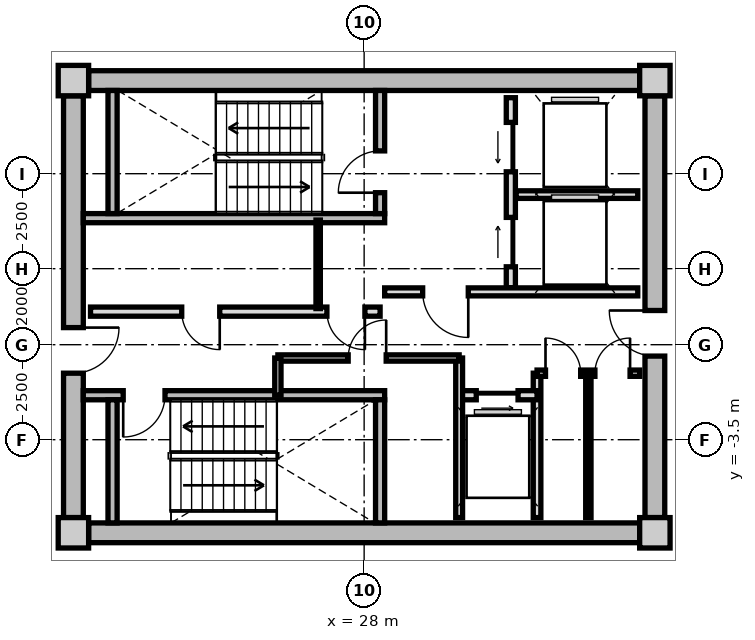
"""IFC4 building model, lengths in metres.
Left out: names, types, materials, properties, quantities, classifications, styles, units other than length and angle.
Written with IfcOpenShell. Run it as: python <this file> out.ifc"""

import sys

from ifc_helpers import new_model, si_unit, direction, frame, frame_2d, origin, origin_2d, place, context, subcontext, project, spatial, rectangle, extrude, source, transform, mapped, element, fill, save


model = new_model("IFC4")
c1 = context("Model", 3, precision=1e-05, world=origin(), true_north=direction((0.0, 1.0)))
c2 = subcontext(c1, "Body", "Model", "MODEL_VIEW")
j1 = project(units=[si_unit("LENGTHUNIT", "METRE"), si_unit("PLANEANGLEUNIT", "RADIAN")], contexts=[c1])
p1 = place(None, origin())
s1 = spatial("IfcSite", under=j1, at=p1, CompositionType="ELEMENT")
p2 = place(p1, origin())
s2 = spatial("IfcBuilding", under=s1, at=p2, CompositionType="ELEMENT")
p3 = place(p2, frame((0.0, 0.0, 199.8)))
s3 = spatial("IfcBuildingStorey", under=s2, at=p3, CompositionType="ELEMENT", Elevation=199.8)
m1 = source(origin(), c2, "Body", "SweptSolid", [
    extrude(rectangle(XDim=0.8, YDim=0.8, at=origin_2d()), origin(), (0.0, 0.0, 1.0), 4.0),
])
for number, where, z_axis, x_axis in (
    (1, (20.35, -5.95, 0.0), (0.0, 0.0, 1.0), (1.0, 0.0, 0.0)),
    (2, (35.65, -5.95, 0.0), (0.0, 0.0, 1.0), (1.0, 0.0, 0.0)),
    (3, (35.65, 5.95, 0.0), (0.0, 0.0, 1.0), (1.0, 0.0, 0.0)),
    (4, (20.35, 5.95, 0.0), (0.0, 0.0, 1.0), (1.0, 0.0, 0.0)),
):
    element("IfcColumn", number, at=place(p3, frame(where, z_axis=z_axis, x_axis=x_axis)), inside=s3, PredefinedType="COLUMN", context=c2, shape_type="MappedRepresentation", body=[
        mapped(m1, transform((0.0, 0.0, 0.0), x_axis=(1.0, 0.0, 0.0), y_axis=(0.0, 1.0, 0.0), z_axis=(0.0, 0.0, 1.0), scale=1.0)),
    ])
m2 = source(origin(), c2, "Body", "SweptSolid", [
    extrude(rectangle(XDim=14.5, YDim=0.52, at=frame_2d((7.25, 0.0))), origin(), (0.0, 0.0, 1.0), 3.71),
])
for number, where, z_axis, x_axis in (
    (5, (20.75, 5.95, 0.0), (0.0, 0.0, 1.0), (1.0, 0.0, 0.0)),
    (6, (35.25, -5.95, 0.0), (0.0, 0.0, 1.0), (-1.0, 0.0, 0.0)),
):
    element("IfcWall", number, at=place(p3, frame(where, z_axis=z_axis, x_axis=x_axis)), inside=s3, PredefinedType="SHEAR", context=c2, shape_type="MappedRepresentation", body=[
        mapped(m2, transform((0.0, 0.0, 0.0), x_axis=(1.0, 0.0, 0.0), y_axis=(0.0, 1.0, 0.0), z_axis=(0.0, 0.0, 1.0), scale=1.0)),
    ])
m3 = source(origin(), c2, "Body", "SweptSolid", [
    extrude(rectangle(XDim=11.1, YDim=0.52, at=frame_2d((5.55, 0.0))), origin(), (0.0, 0.0, 1.0), 3.71),
])
p4 = place(p3, frame((20.35, -5.55, 0.0), z_axis=(0.0, 0.0, 1.0), x_axis=(0.0, 1.0, 0.0)))
e7 = element("IfcWall", 7, at=p4, inside=s3, PredefinedType="SHEAR", context=c2, shape_type="MappedRepresentation", body=[
    mapped(m3, transform((0.0, 0.0, 0.0), x_axis=(1.0, 0.0, 0.0), y_axis=(0.0, 1.0, 0.0), z_axis=(0.0, 0.0, 1.0), scale=1.0)),
])
p5 = place(p4, frame((3.8, 0.0, 0.0)))
e8 = element("IfcOpeningElement", 8, at=p5, cuts=e7, PredefinedType="OPENING", context=c2, shape_type="SweptSolid", body=[
    extrude(rectangle(XDim=1.2, YDim=2.15, at=frame_2d((0.6, 1.075))), frame((0.0, 0.27, 0.0), z_axis=(0.0, -1.0, 0.0), x_axis=(1.0, 0.0, 0.0)), (0.0, 0.0, 1.0), 0.54),
])
p6 = place(p3, frame((35.65, 5.55, 0.0), z_axis=(0.0, 0.0, 1.0), x_axis=(0.0, -1.0, 0.0)))
e9 = element("IfcWall", 9, at=p6, inside=s3, PredefinedType="SHEAR", context=c2, shape_type="MappedRepresentation", body=[
    mapped(m3, transform((0.0, 0.0, 0.0), x_axis=(1.0, 0.0, 0.0), y_axis=(0.0, 1.0, 0.0), z_axis=(0.0, 0.0, 1.0), scale=1.0)),
])
p7 = place(p6, frame((5.65, 0.0, 0.0)))
e10 = element("IfcOpeningElement", 10, at=p7, cuts=e9, PredefinedType="OPENING", context=c2, shape_type="SweptSolid", body=[
    extrude(rectangle(XDim=1.2, YDim=2.15, at=frame_2d((0.6, 1.075))), frame((0.0, 0.27, 0.0), z_axis=(0.0, -1.0, 0.0), x_axis=(1.0, 0.0, 0.0)), (0.0, 0.0, 1.0), 0.54),
])
m4 = source(origin(), c2, "Body", "SweptSolid", [
    extrude(rectangle(XDim=7.93, YDim=0.24, at=frame_2d((3.965, 0.0))), origin(), (0.0, 0.0, 1.0), 3.71),
])
p8 = place(p3, frame((20.61, 2.33, 0.0), z_axis=(0.0, 0.0, 1.0), x_axis=(1.0, 0.0, 0.0)))
e11 = element("IfcWall", 11, at=p8, inside=s3, PredefinedType="PARTITIONING", context=c2, shape_type="MappedRepresentation", body=[
    mapped(m4, transform((0.0, 0.0, 0.0), x_axis=(1.0, 0.0, 0.0), y_axis=(0.0, 1.0, 0.0), z_axis=(0.0, 0.0, 1.0), scale=1.0)),
])
m5 = source(origin(), c2, "Body", "SweptSolid", [
    extrude(rectangle(XDim=3.24, YDim=0.24, at=frame_2d((1.62, 0.0))), origin(), (0.0, 0.0, 1.0), 3.71),
])
p9 = place(p3, frame((21.38, 2.45, 0.0), z_axis=(0.0, 0.0, 1.0), x_axis=(0.0, 1.0, 0.0)))
e12 = element("IfcWall", 12, at=p9, inside=s3, PredefinedType="PARTITIONING", context=c2, shape_type="MappedRepresentation", body=[
    mapped(m5, transform((0.0, 0.0, 0.0), x_axis=(1.0, 0.0, 0.0), y_axis=(0.0, 1.0, 0.0), z_axis=(0.0, 0.0, 1.0), scale=1.0)),
])
p10 = place(p3, frame((28.42, 2.45, 0.0), z_axis=(0.0, 0.0, 1.0), x_axis=(0.0, 1.0, 0.0)))
e13 = element("IfcWall", 13, at=p10, inside=s3, PredefinedType="PARTITIONING", context=c2, shape_type="MappedRepresentation", body=[
    mapped(m5, transform((0.0, 0.0, 0.0), x_axis=(1.0, 0.0, 0.0), y_axis=(0.0, 1.0, 0.0), z_axis=(0.0, 0.0, 1.0), scale=1.0)),
])
p11 = place(p10, frame((0.55, 0.0, 0.0)))
e14 = element("IfcOpeningElement", 14, at=p11, cuts=e13, PredefinedType="OPENING", context=c2, shape_type="SweptSolid", body=[
    extrude(rectangle(XDim=1.1, YDim=2.15, at=frame_2d((0.55, 1.075))), frame((0.0, 0.13, 0.0), z_axis=(0.0, -1.0, 0.0), x_axis=(1.0, 0.0, 0.0)), (0.0, 0.0, 1.0), 0.26),
])
p12 = place(p3, frame((20.61, -2.33, 0.0), z_axis=(0.0, 0.0, 1.0), x_axis=(1.0, 0.0, 0.0)))
e15 = element("IfcWall", 15, at=p12, inside=s3, PredefinedType="PARTITIONING", context=c2, shape_type="MappedRepresentation", body=[
    mapped(m4, transform((0.0, 0.0, 0.0), x_axis=(1.0, 0.0, 0.0), y_axis=(0.0, 1.0, 0.0), z_axis=(0.0, 0.0, 1.0), scale=1.0)),
])
p13 = place(p12, frame((1.05, 0.0, 0.0)))
e16 = element("IfcOpeningElement", 16, at=p13, cuts=e15, PredefinedType="OPENING", context=c2, shape_type="SweptSolid", body=[
    extrude(rectangle(XDim=1.1, YDim=2.15, at=frame_2d((0.55, 1.075))), frame((0.0, 0.13, 0.0), z_axis=(0.0, -1.0, 0.0), x_axis=(1.0, 0.0, 0.0)), (0.0, 0.0, 1.0), 0.26),
])
for number, where, z_axis, x_axis in (
    (17, (21.38, -5.69, 0.0), (0.0, 0.0, 1.0), (0.0, 1.0, 0.0)),
    (18, (28.42, -5.69, 0.0), (0.0, 0.0, 1.0), (0.0, 1.0, 0.0)),
):
    element("IfcWall", number, at=place(p3, frame(where, z_axis=z_axis, x_axis=x_axis)), inside=s3, PredefinedType="PARTITIONING", context=c2, shape_type="MappedRepresentation", body=[
        mapped(m5, transform((0.0, 0.0, 0.0), x_axis=(1.0, 0.0, 0.0), y_axis=(0.0, 1.0, 0.0), z_axis=(0.0, 0.0, 1.0), scale=1.0)),
    ])
m6 = source(origin(), c2, "Body", "SweptSolid", [
    extrude(rectangle(XDim=5.0, YDim=0.24, at=frame_2d((2.5, 0.0))), origin(), (0.0, 0.0, 1.0), 3.695),
])
p14 = place(p3, frame((31.86, 0.5, 0.0), z_axis=(0.0, 0.0, 1.0), x_axis=(0.0, 1.0, 0.0)))
e19 = element("IfcWall", 19, at=p14, inside=s3, PredefinedType="PARTITIONING", context=c2, shape_type="MappedRepresentation", body=[
    mapped(m6, transform((0.0, 0.0, 0.0), x_axis=(1.0, 0.0, 0.0), y_axis=(0.0, 1.0, 0.0), z_axis=(0.0, 0.0, 1.0), scale=1.0)),
])
p15 = place(p14, frame((3.05, 0.0, 0.0)))
e20 = element("IfcOpeningElement", 20, at=p15, cuts=e19, PredefinedType="OPENING", context=c2, shape_type="SweptSolid", body=[
    extrude(rectangle(XDim=1.3, YDim=2.2, at=frame_2d((0.65, 1.1))), frame((0.0, 0.13, 0.0), z_axis=(0.0, -1.0, 0.0), x_axis=(1.0, 0.0, 0.0)), (0.0, 0.0, 1.0), 0.26),
])
p16 = place(p14, frame((0.55, 0.0, 0.0)))
e21 = element("IfcOpeningElement", 21, at=p16, cuts=e19, PredefinedType="OPENING", context=c2, shape_type="SweptSolid", body=[
    extrude(rectangle(XDim=1.3, YDim=2.2, at=frame_2d((0.65, 1.1))), frame((0.0, 0.13, 0.0), z_axis=(0.0, -1.0, 0.0), x_axis=(1.0, 0.0, 0.0)), (0.0, 0.0, 1.0), 0.26),
])
m7 = source(origin(), c2, "Body", "SweptSolid", [
    extrude(rectangle(XDim=3.2, YDim=0.2, at=frame_2d((1.6, 0.0))), origin(), (0.0, 0.0, 1.0), 3.695),
])
p17 = place(p3, frame((32.0, 2.95, 0.0), z_axis=(0.0, 0.0, 1.0), x_axis=(1.0, 0.0, 0.0)))
e22 = element("IfcWall", 22, at=p17, inside=s3, PredefinedType="PARTITIONING", context=c2, shape_type="MappedRepresentation", body=[
    mapped(m7, transform((0.0, 0.0, 0.0), x_axis=(1.0, 0.0, 0.0), y_axis=(0.0, 1.0, 0.0), z_axis=(0.0, 0.0, 1.0), scale=1.0)),
])
m8 = source(origin(), c2, "Body", "SweptSolid", [
    extrude(rectangle(XDim=6.66, YDim=0.21, at=frame_2d((3.33, 0.0))), origin(), (0.0, 0.0, 1.0), 3.695),
])
p18 = place(p3, frame((28.54, 0.39, 0.0), z_axis=(0.0, 0.0, 1.0), x_axis=(1.0, 0.0, 0.0)))
e23 = element("IfcWall", 23, at=p18, inside=s3, PredefinedType="PARTITIONING", context=c2, shape_type="MappedRepresentation", body=[
    mapped(m8, transform((0.0, 0.0, 0.0), x_axis=(1.0, 0.0, 0.0), y_axis=(0.0, 1.0, 0.0), z_axis=(0.0, 0.0, 1.0), scale=1.0)),
])
p19 = place(p18, frame((1.0, 0.0, 0.0)))
e24 = element("IfcOpeningElement", 24, at=p19, cuts=e23, PredefinedType="OPENING", context=c2, shape_type="SweptSolid", body=[
    extrude(rectangle(XDim=1.2, YDim=2.15, at=frame_2d((0.6, 1.075))), frame((0.0, 0.115, 0.0), z_axis=(0.0, -1.0, 0.0), x_axis=(1.0, 0.0, 0.0)), (0.0, 0.0, 1.0), 0.23),
])
m9 = source(origin(), c2, "Body", "SweptSolid", [
    extrude(rectangle(XDim=7.62, YDim=0.24, at=frame_2d((3.81, 0.0))), origin(), (0.0, 0.0, 1.0), 3.695),
])
p20 = place(p3, frame((20.8, -0.13, 0.0), z_axis=(0.0, 0.0, 1.0), x_axis=(1.0, 0.0, 0.0)))
e25 = element("IfcWall", 25, at=p20, inside=s3, PredefinedType="PARTITIONING", context=c2, shape_type="MappedRepresentation", body=[
    mapped(m9, transform((0.0, 0.0, 0.0), x_axis=(1.0, 0.0, 0.0), y_axis=(0.0, 1.0, 0.0), z_axis=(0.0, 0.0, 1.0), scale=1.0)),
])
p21 = place(p20, frame((6.22, 0.0, 0.0)))
e26 = element("IfcOpeningElement", 26, at=p21, cuts=e25, PredefinedType="OPENING", context=c2, shape_type="SweptSolid", body=[
    extrude(rectangle(XDim=1.0, YDim=2.1, at=frame_2d((0.5, 1.05))), frame((0.0, 0.13, 0.0), z_axis=(0.0, -1.0, 0.0), x_axis=(1.0, 0.0, 0.0)), (0.0, 0.0, 1.0), 0.26),
])
p22 = place(p20, frame((2.4, 0.0, 0.0)))
e27 = element("IfcOpeningElement", 27, at=p22, cuts=e25, PredefinedType="OPENING", context=c2, shape_type="SweptSolid", body=[
    extrude(rectangle(XDim=1.0, YDim=2.1, at=frame_2d((0.5, 1.05))), frame((0.0, 0.13, 0.0), z_axis=(0.0, -1.0, 0.0), x_axis=(1.0, 0.0, 0.0)), (0.0, 0.0, 1.0), 0.26),
])
m10 = source(origin(), c2, "Body", "SweptSolid", [
    extrude(rectangle(XDim=2.33, YDim=0.115, at=frame_2d((1.165, 0.0))), origin(), (0.0, 0.0, 1.0), 3.695),
])
p23 = place(p3, frame((26.79, -0.05, 0.0), z_axis=(0.0, 0.0, 1.0), x_axis=(0.0, 1.0, 0.0)))
e28 = element("IfcWall", 28, at=p23, inside=s3, PredefinedType="PARTITIONING", context=c2, shape_type="MappedRepresentation", body=[
    mapped(m10, transform((0.0, 0.0, 0.0), x_axis=(1.0, 0.0, 0.0), y_axis=(0.0, 1.0, 0.0), z_axis=(0.0, 0.0, 1.0), scale=1.0)),
])
m11 = source(origin(), c2, "Body", "SweptSolid", [
    extrude(rectangle(XDim=3.8, YDim=0.2, at=frame_2d((1.9, 0.0))), origin(), (0.0, 0.0, 1.0), 3.695),
])
p24 = place(p3, frame((32.55, -5.55, 0.0), z_axis=(0.0, 0.0, 1.0), x_axis=(0.0, 1.0, 0.0)))
e29 = element("IfcWall", 29, at=p24, inside=s3, PredefinedType="PARTITIONING", context=c2, shape_type="MappedRepresentation", body=[
    mapped(m11, transform((0.0, 0.0, 0.0), x_axis=(1.0, 0.0, 0.0), y_axis=(0.0, 1.0, 0.0), z_axis=(0.0, 0.0, 1.0), scale=1.0)),
])
m12 = source(origin(), c2, "Body", "SweptSolid", [
    extrude(rectangle(XDim=2.05, YDim=0.24, at=frame_2d((1.025, 0.0))), origin(), (0.0, 0.0, 1.0), 3.695),
])
p25 = place(p3, frame((30.5, -2.33, 0.0), z_axis=(0.0, 0.0, 1.0), x_axis=(1.0, 0.0, 0.0)))
e30 = element("IfcWall", 30, at=p25, inside=s3, PredefinedType="PARTITIONING", context=c2, shape_type="MappedRepresentation", body=[
    mapped(m12, transform((0.0, 0.0, 0.0), x_axis=(1.0, 0.0, 0.0), y_axis=(0.0, 1.0, 0.0), z_axis=(0.0, 0.0, 1.0), scale=1.0)),
])
p26 = place(p25, frame((0.45, 0.0, 0.0)))
e31 = element("IfcOpeningElement", 31, at=p26, cuts=e30, PredefinedType="OPENING", context=c2, shape_type="SweptSolid", body=[
    extrude(rectangle(XDim=1.1, YDim=2.2, at=frame_2d((0.55, 1.1))), frame((0.0, 0.13, 0.0), z_axis=(0.0, -1.0, 0.0), x_axis=(1.0, 0.0, 0.0)), (0.0, 0.0, 1.0), 0.26),
])
m13 = source(origin(), c2, "Body", "SweptSolid", [
    extrude(rectangle(XDim=4.2, YDim=0.18, at=frame_2d((2.1, 0.0))), origin(), (0.0, 0.0, 1.0), 3.695),
])
p27 = place(p3, frame((30.5, -5.55, 0.0), z_axis=(0.0, 0.0, 1.0), x_axis=(0.0, 1.0, 0.0)))
e32 = element("IfcWall", 32, at=p27, inside=s3, PredefinedType="PARTITIONING", context=c2, shape_type="MappedRepresentation", body=[
    mapped(m13, transform((0.0, 0.0, 0.0), x_axis=(1.0, 0.0, 0.0), y_axis=(0.0, 1.0, 0.0), z_axis=(0.0, 0.0, 1.0), scale=1.0)),
])
m14 = source(origin(), c2, "Body", "SweptSolid", [
    extrude(rectangle(XDim=4.77, YDim=0.165, at=frame_2d((2.385, 0.0))), origin(), (0.0, 0.0, 1.0), 3.695),
])
p28 = place(p3, frame((25.73, -1.35, 0.0), z_axis=(0.0, 0.0, 1.0), x_axis=(1.0, 0.0, 0.0)))
e33 = element("IfcWall", 33, at=p28, inside=s3, PredefinedType="PARTITIONING", context=c2, shape_type="MappedRepresentation", body=[
    mapped(m14, transform((0.0, 0.0, 0.0), x_axis=(1.0, 0.0, 0.0), y_axis=(0.0, 1.0, 0.0), z_axis=(0.0, 0.0, 1.0), scale=1.0)),
])
p29 = place(p28, frame((1.85, 0.0, 0.0)))
e34 = element("IfcOpeningElement", 34, at=p29, cuts=e33, PredefinedType="OPENING", context=c2, shape_type="SweptSolid", body=[
    extrude(rectangle(XDim=1.0, YDim=2.1, at=frame_2d((0.5, 1.05))), frame((0.0, 0.093, 0.0), z_axis=(0.0, -1.0, 0.0), x_axis=(1.0, 0.0, 0.0)), (0.0, 0.0, 1.0), 0.185),
])
m15 = source(origin(), c2, "Body", "SweptSolid", [
    extrude(rectangle(XDim=0.98, YDim=0.165, at=frame_2d((0.49, 0.0))), origin(), (0.0, 0.0, 1.0), 3.695),
])
p30 = place(p3, frame((25.73, -2.33, 0.0), z_axis=(0.0, 0.0, 1.0), x_axis=(0.0, 1.0, 0.0)))
e35 = element("IfcWall", 35, at=p30, inside=s3, PredefinedType="PARTITIONING", context=c2, shape_type="MappedRepresentation", body=[
    mapped(m15, transform((0.0, 0.0, 0.0), x_axis=(1.0, 0.0, 0.0), y_axis=(0.0, 1.0, 0.0), z_axis=(0.0, 0.0, 1.0), scale=1.0)),
])
m16 = source(origin(), c2, "Body", "SweptSolid", [
    extrude(rectangle(XDim=2.7, YDim=0.165, at=frame_2d((1.35, 0.0))), origin(), (0.0, 0.0, 1.0), 3.695),
])
p31 = place(p3, frame((32.55, -1.75, 0.0), z_axis=(0.0, 0.0, 1.0), x_axis=(1.0, 0.0, 0.0)))
e36 = element("IfcWall", 36, at=p31, inside=s3, PredefinedType="PARTITIONING", context=c2, shape_type="MappedRepresentation", body=[
    mapped(m16, transform((0.0, 0.0, 0.0), x_axis=(1.0, 0.0, 0.0), y_axis=(0.0, 1.0, 0.0), z_axis=(0.0, 0.0, 1.0), scale=1.0)),
])
p32 = place(p31, frame((0.222, 0.0, 0.0)))
e37 = element("IfcOpeningElement", 37, at=p32, cuts=e36, PredefinedType="OPENING", context=c2, shape_type="SweptSolid", body=[
    extrude(rectangle(XDim=0.925, YDim=2.1, at=frame_2d((0.462, 1.05))), frame((0.0, 0.093, 0.0), z_axis=(0.0, -1.0, 0.0), x_axis=(1.0, 0.0, 0.0)), (0.0, 0.0, 1.0), 0.185),
])
p33 = place(p31, frame((1.522, 0.0, 0.0)))
e38 = element("IfcOpeningElement", 38, at=p33, cuts=e36, PredefinedType="OPENING", context=c2, shape_type="SweptSolid", body=[
    extrude(rectangle(XDim=0.925, YDim=2.1, at=frame_2d((0.462, 1.05))), frame((0.0, 0.093, 0.0), z_axis=(0.0, -1.0, 0.0), x_axis=(1.0, 0.0, 0.0)), (0.0, 0.0, 1.0), 0.185),
])
m17 = source(origin(), c2, "Body", "SweptSolid", [
    extrude(rectangle(XDim=3.8, YDim=0.14, at=frame_2d((1.9, 0.0))), origin(), (0.0, 0.0, 1.0), 3.695),
])
p34 = place(p3, frame((33.9, -5.55, 0.0), z_axis=(0.0, 0.0, 1.0), x_axis=(0.0, 1.0, 0.0)))
e39 = element("IfcWall", 39, at=p34, inside=s3, PredefinedType="PARTITIONING", context=c2, shape_type="MappedRepresentation", body=[
    mapped(m17, transform((0.0, 0.0, 0.0), x_axis=(1.0, 0.0, 0.0), y_axis=(0.0, 1.0, 0.0), z_axis=(0.0, 0.0, 1.0), scale=1.0)),
])
m18 = source(origin(), c2, "Body", "SweptSolid", [
    extrude(rectangle(XDim=1.1, YDim=2.15, at=frame_2d((0.55, 1.075))), frame((0.0, 0.025, 0.0), z_axis=(0.0, -1.0, 0.0), x_axis=(1.0, 0.0, 0.0)), (0.0, 0.0, 1.0), 0.05),
])
p35 = place(p11, origin())
e40 = element("IfcDoor", 40, at=p35, inside=s3, OperationType="SINGLE_SWING_LEFT", PredefinedType="DOOR", context=c2, shape_type="MappedRepresentation", body=[
    mapped(m18, transform((0.0, 0.0, 0.0), x_axis=(1.0, 0.0, 0.0), y_axis=(0.0, 1.0, 0.0), z_axis=(0.0, 0.0, 1.0), scale=1.0)),
])
fill(e14, e40)
p36 = place(p13, frame((1.1, 0.0, 0.0), z_axis=(0.0, 0.0, 1.0), x_axis=(-1.0, 0.0, 0.0)))
e41 = element("IfcDoor", 41, at=p36, inside=s3, OperationType="SINGLE_SWING_RIGHT", PredefinedType="DOOR", context=c2, shape_type="MappedRepresentation", body=[
    mapped(m18, transform((0.0, 0.0, 0.0), x_axis=(1.0, 0.0, 0.0), y_axis=(0.0, 1.0, 0.0), z_axis=(0.0, 0.0, 1.0), scale=1.0)),
])
fill(e16, e41)
m19 = source(origin(), c2, "Body", "SweptSolid", [
    extrude(rectangle(XDim=1.3, YDim=2.2, at=frame_2d((0.65, 1.1))), frame((0.0, 0.025, 0.0), z_axis=(0.0, -1.0, 0.0), x_axis=(1.0, 0.0, 0.0)), (0.0, 0.0, 1.0), 0.05),
])
p37 = place(p15, origin())
e42 = element("IfcDoor", 42, at=p37, inside=s3, OperationType="SLIDING_TO_LEFT", PredefinedType="DOOR", context=c2, shape_type="MappedRepresentation", body=[
    mapped(m19, transform((0.0, 0.0, 0.0), x_axis=(1.0, 0.0, 0.0), y_axis=(0.0, 1.0, 0.0), z_axis=(0.0, 0.0, 1.0), scale=1.0)),
])
fill(e20, e42)
p38 = place(p16, origin())
e43 = element("IfcDoor", 43, at=p38, inside=s3, OperationType="SLIDING_TO_RIGHT", PredefinedType="DOOR", context=c2, shape_type="MappedRepresentation", body=[
    mapped(m19, transform((0.0, 0.0, 0.0), x_axis=(1.0, 0.0, 0.0), y_axis=(0.0, 1.0, 0.0), z_axis=(0.0, 0.0, 1.0), scale=1.0)),
])
fill(e21, e43)
m20 = source(origin(), c2, "Body", "SweptSolid", [
    extrude(rectangle(XDim=1.2, YDim=2.15, at=frame_2d((0.6, 1.075))), frame((0.0, 0.025, 0.0), z_axis=(0.0, -1.0, 0.0), x_axis=(1.0, 0.0, 0.0)), (0.0, 0.0, 1.0), 0.05),
])
p39 = place(p19, frame((1.2, 0.0, 0.0), z_axis=(0.0, 0.0, 1.0), x_axis=(-1.0, 0.0, 0.0)))
e44 = element("IfcDoor", 44, at=p39, inside=s3, OperationType="SINGLE_SWING_LEFT", PredefinedType="DOOR", context=c2, shape_type="MappedRepresentation", body=[
    mapped(m20, transform((0.0, 0.0, 0.0), x_axis=(1.0, 0.0, 0.0), y_axis=(0.0, 1.0, 0.0), z_axis=(0.0, 0.0, 1.0), scale=1.0)),
])
fill(e24, e44)
p40 = place(p5, frame((1.2, 0.0, 0.0), z_axis=(0.0, 0.0, 1.0), x_axis=(-1.0, 0.0, 0.0)))
e45 = element("IfcDoor", 45, at=p40, inside=s3, OperationType="SINGLE_SWING_LEFT", PredefinedType="DOOR", context=c2, shape_type="MappedRepresentation", body=[
    mapped(m20, transform((0.0, 0.0, 0.0), x_axis=(1.0, 0.0, 0.0), y_axis=(0.0, 1.0, 0.0), z_axis=(0.0, 0.0, 1.0), scale=1.0)),
])
fill(e8, e45)
p41 = place(p7, frame((1.2, 0.0, 0.0), z_axis=(0.0, 0.0, 1.0), x_axis=(-1.0, 0.0, 0.0)))
e46 = element("IfcDoor", 46, at=p41, inside=s3, OperationType="SINGLE_SWING_RIGHT", PredefinedType="DOOR", context=c2, shape_type="MappedRepresentation", body=[
    mapped(m20, transform((0.0, 0.0, 0.0), x_axis=(1.0, 0.0, 0.0), y_axis=(0.0, 1.0, 0.0), z_axis=(0.0, 0.0, 1.0), scale=1.0)),
])
fill(e10, e46)
m21 = source(origin(), c2, "Body", "SweptSolid", [
    extrude(rectangle(XDim=1.0, YDim=2.1, at=frame_2d((0.5, 1.05))), frame((0.0, 0.025, 0.0), z_axis=(0.0, -1.0, 0.0), x_axis=(1.0, 0.0, 0.0)), (0.0, 0.0, 1.0), 0.05),
])
p42 = place(p21, frame((1.0, 0.0, 0.0), z_axis=(0.0, 0.0, 1.0), x_axis=(-1.0, 0.0, 0.0)))
e47 = element("IfcDoor", 47, at=p42, inside=s3, OperationType="SINGLE_SWING_LEFT", PredefinedType="DOOR", context=c2, shape_type="MappedRepresentation", body=[
    mapped(m21, transform((0.0, 0.0, 0.0), x_axis=(1.0, 0.0, 0.0), y_axis=(0.0, 1.0, 0.0), z_axis=(0.0, 0.0, 1.0), scale=1.0)),
])
fill(e26, e47)
p43 = place(p22, frame((1.0, 0.0, 0.0), z_axis=(0.0, 0.0, 1.0), x_axis=(-1.0, 0.0, 0.0)))
e48 = element("IfcDoor", 48, at=p43, inside=s3, OperationType="SINGLE_SWING_LEFT", PredefinedType="DOOR", context=c2, shape_type="MappedRepresentation", body=[
    mapped(m21, transform((0.0, 0.0, 0.0), x_axis=(1.0, 0.0, 0.0), y_axis=(0.0, 1.0, 0.0), z_axis=(0.0, 0.0, 1.0), scale=1.0)),
])
fill(e27, e48)
m22 = source(origin(), c2, "Body", "SweptSolid", [
    extrude(rectangle(XDim=1.1, YDim=2.2, at=frame_2d((0.55, 1.1))), frame((0.0, 0.025, 0.0), z_axis=(0.0, -1.0, 0.0), x_axis=(1.0, 0.0, 0.0)), (0.0, 0.0, 1.0), 0.05),
])
p44 = place(p26, frame((1.1, 0.0, 0.0), z_axis=(0.0, 0.0, 1.0), x_axis=(-1.0, 0.0, 0.0)))
e49 = element("IfcDoor", 49, at=p44, inside=s3, OperationType="SLIDING_TO_RIGHT", PredefinedType="DOOR", context=c2, shape_type="MappedRepresentation", body=[
    mapped(m22, transform((0.0, 0.0, 0.0), x_axis=(1.0, 0.0, 0.0), y_axis=(0.0, 1.0, 0.0), z_axis=(0.0, 0.0, 1.0), scale=1.0)),
])
fill(e31, e49)
p45 = place(p29, origin())
e50 = element("IfcDoor", 50, at=p45, inside=s3, OperationType="SINGLE_SWING_RIGHT", PredefinedType="DOOR", context=c2, shape_type="MappedRepresentation", body=[
    mapped(m21, transform((0.0, 0.0, 0.0), x_axis=(1.0, 0.0, 0.0), y_axis=(0.0, 1.0, 0.0), z_axis=(0.0, 0.0, 1.0), scale=1.0)),
])
fill(e34, e50)
m23 = source(origin(), c2, "Body", "SweptSolid", [
    extrude(rectangle(XDim=0.925, YDim=2.1, at=frame_2d((0.462, 1.05))), frame((0.0, 0.025, 0.0), z_axis=(0.0, -1.0, 0.0), x_axis=(1.0, 0.0, 0.0)), (0.0, 0.0, 1.0), 0.05),
])
p46 = place(p32, origin())
e51 = element("IfcDoor", 51, at=p46, inside=s3, OperationType="SINGLE_SWING_LEFT", PredefinedType="DOOR", context=c2, shape_type="MappedRepresentation", body=[
    mapped(m23, transform((0.0, 0.0, 0.0), x_axis=(1.0, 0.0, 0.0), y_axis=(0.0, 1.0, 0.0), z_axis=(0.0, 0.0, 1.0), scale=1.0)),
])
fill(e37, e51)
p47 = place(p33, origin())
e52 = element("IfcDoor", 52, at=p47, inside=s3, OperationType="SINGLE_SWING_RIGHT", PredefinedType="DOOR", context=c2, shape_type="MappedRepresentation", body=[
    mapped(m23, transform((0.0, 0.0, 0.0), x_axis=(1.0, 0.0, 0.0), y_axis=(0.0, 1.0, 0.0), z_axis=(0.0, 0.0, 1.0), scale=1.0)),
])
fill(e38, e52)
save(model, sys.argv[1])
